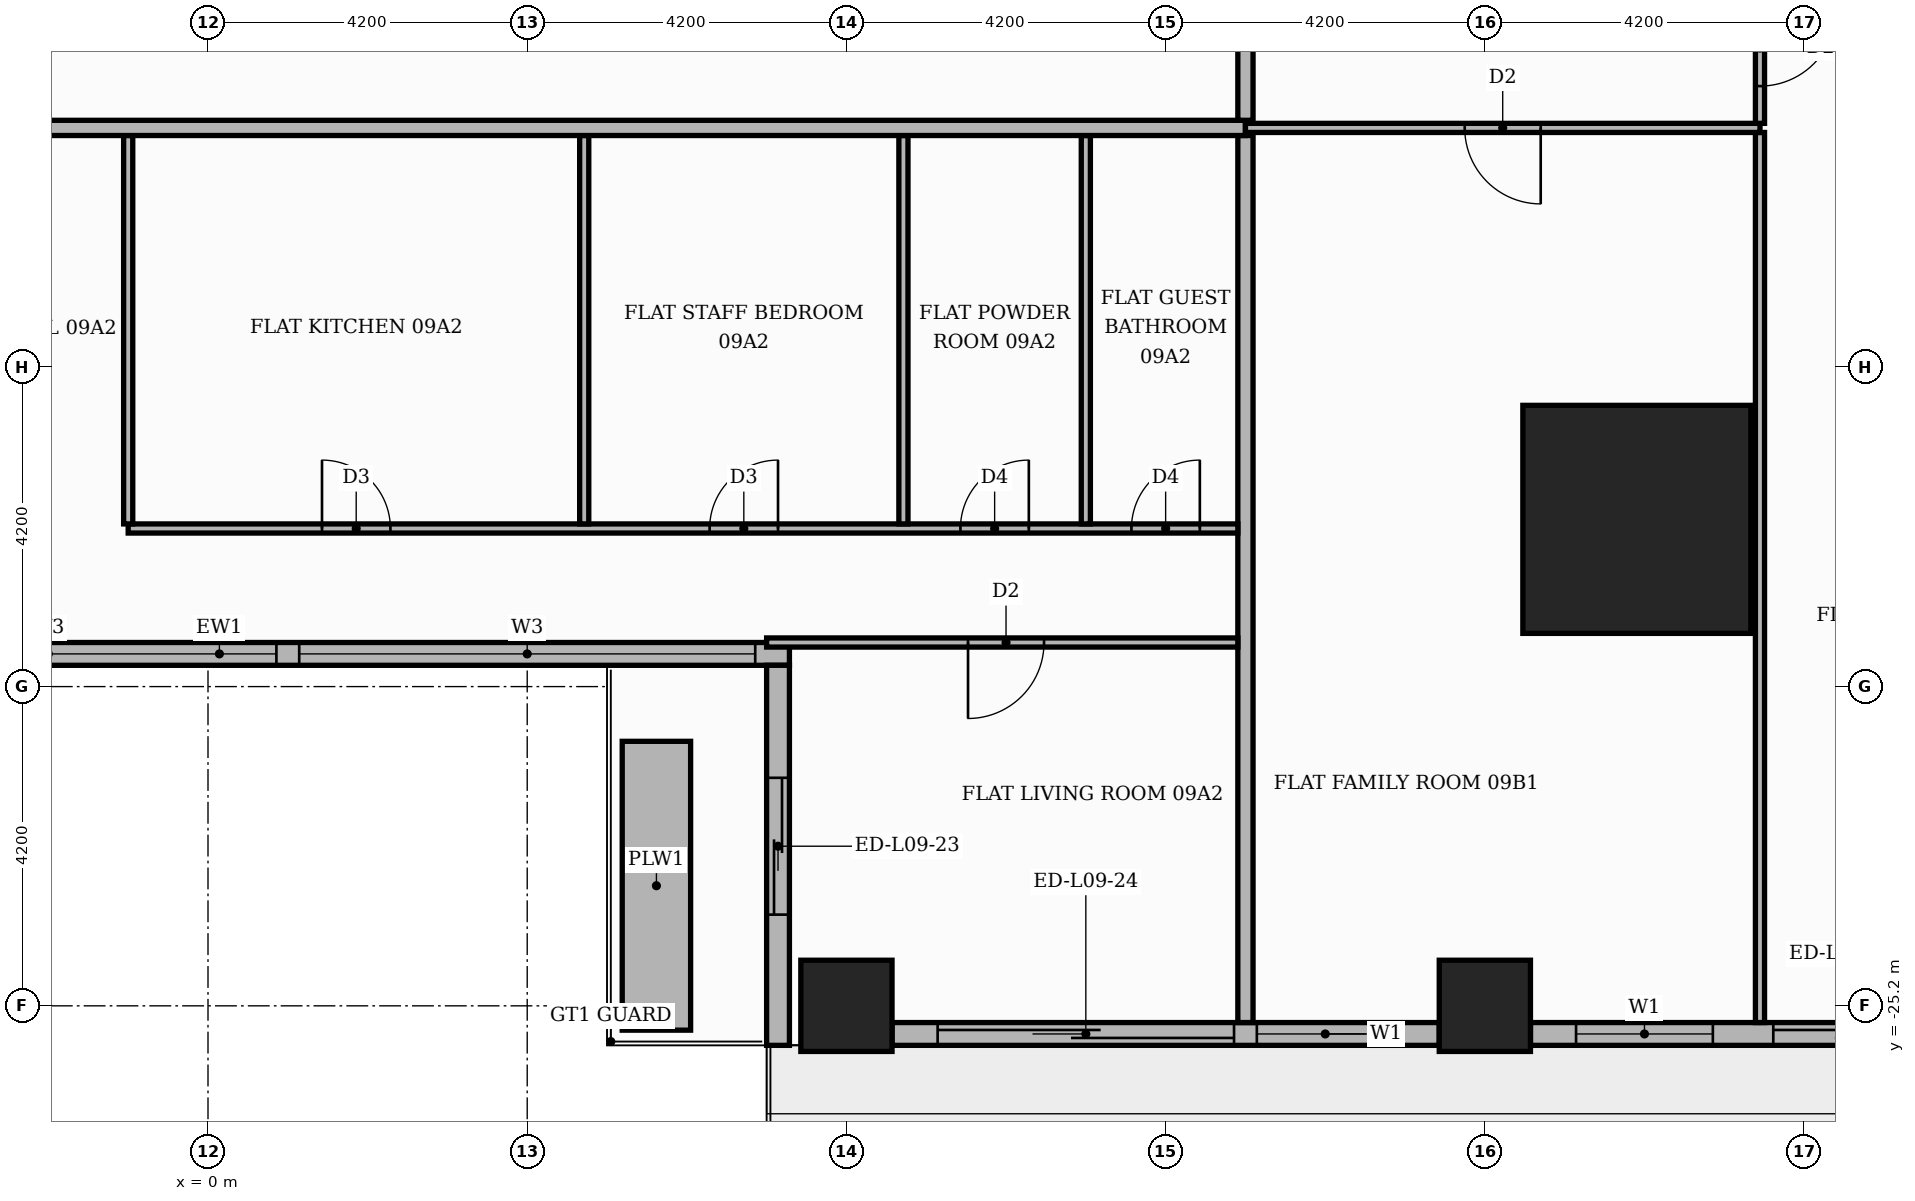
"""IFC4 building model, lengths in metres.
Left out: names, types, materials, properties, quantities, classifications, styles, units other than length and angle.
Written with IfcOpenShell. Run it as: python <this file> out.ifc"""

import sys

from ifc_helpers import new_model, si_unit, direction, frame, frame_2d, origin, origin_2d, place, context, subcontext, project, spatial, rectangle, extrude, element, fill, save


model = new_model("IFC4")
c1 = context("Model", 3, precision=1e-05, world=origin(), true_north=direction((0.0, 1.0)))
c2 = subcontext(c1, "Body", "Model", "MODEL_VIEW")
j1 = project(units=[si_unit("LENGTHUNIT", "METRE"), si_unit("PLANEANGLEUNIT", "RADIAN")], contexts=[c1])
p1 = place(None, origin())
s1 = spatial("IfcSite", under=j1, at=p1, CompositionType="ELEMENT")
p2 = place(p1, origin())
s2 = spatial("IfcBuilding", under=s1, at=p2, CompositionType="ELEMENT")
p3 = place(p2, frame((0.0, 0.0, 42.6)))
s3 = spatial("IfcBuildingStorey", under=s2, at=p3, CompositionType="ELEMENT", Elevation=42.6)
p4 = place(p3, frame((18.8, -18.8, 0.0), z_axis=(0.0, 0.0, 1.0), x_axis=(1.0, 0.0, 0.0)))
e1 = element("IfcColumn", 1, at=p4, inside=s3, PredefinedType="COLUMN", context=c2, shape_type="SweptSolid", body=[
    extrude(rectangle(XDim=3.0, YDim=3.0, at=origin_2d()), origin(), (0.0, 0.0, 1.0), 3.9),
])
for number, where, z_axis, x_axis in (
    (2, (8.4, -25.2, 0.0), (0.0, 0.0, 1.0), (1.0, 0.0, 0.0)),
    (3, (16.8, -25.2, 0.0), (0.0, 0.0, 1.0), (1.0, 0.0, 0.0)),
):
    element("IfcColumn", number, at=place(p3, frame(where, z_axis=z_axis, x_axis=x_axis)), inside=s3, PredefinedType="COLUMN", context=c2, shape_type="SweptSolid", body=[
        extrude(rectangle(XDim=1.2, YDim=1.2, at=origin_2d()), origin(), (0.0, 0.0, 1.0), 3.9),
    ])
p5 = place(p3, frame((-7.35, -20.57, 0.0), z_axis=(0.0, 0.0, 1.0), x_axis=(1.0, 0.0, 0.0)))
e4 = element("IfcWall", 4, at=p5, inside=s3, PredefinedType="STANDARD", context=c2, shape_type="SweptSolid", body=[
    extrude(rectangle(XDim=15.0, YDim=0.3, at=frame_2d((7.5, 0.0))), origin(), (0.0, 0.0, 1.0), 3.48),
])
p6 = place(p5, frame((0.15, 0.0, 0.9)))
e5 = element("IfcOpeningElement", 5, at=p6, cuts=e4, PredefinedType="OPENING", context=c2, shape_type="SweptSolid", body=[
    extrude(rectangle(XDim=1.8, YDim=2.1, at=frame_2d((0.9, 1.05))), frame((0.0, 0.16, 0.0), z_axis=(0.0, -1.0, 0.0), x_axis=(1.0, 0.0, 0.0)), (0.0, 0.0, 1.0), 0.32),
])
p7 = place(p5, frame((2.25, 0.0, 0.9)))
e6 = element("IfcOpeningElement", 6, at=p7, cuts=e4, PredefinedType="OPENING", context=c2, shape_type="SweptSolid", body=[
    extrude(rectangle(XDim=6.0, YDim=2.1, at=frame_2d((3.0, 1.05))), frame((0.0, 0.16, 0.0), z_axis=(0.0, -1.0, 0.0), x_axis=(1.0, 0.0, 0.0)), (0.0, 0.0, 1.0), 0.32),
])
p8 = place(p5, frame((8.55, 0.0, 0.9)))
e7 = element("IfcOpeningElement", 7, at=p8, cuts=e4, PredefinedType="OPENING", context=c2, shape_type="SweptSolid", body=[
    extrude(rectangle(XDim=6.0, YDim=2.1, at=frame_2d((3.0, 1.05))), frame((0.0, 0.16, 0.0), z_axis=(0.0, -1.0, 0.0), x_axis=(1.0, 0.0, 0.0)), (0.0, 0.0, 1.0), 0.32),
])
p9 = place(p3, frame((7.5, -20.72, 0.0), z_axis=(0.0, 0.0, 1.0), x_axis=(0.0, -1.0, 0.0)))
e8 = element("IfcWall", 8, at=p9, inside=s3, PredefinedType="STANDARD", context=c2, shape_type="SweptSolid", body=[
    extrude(rectangle(XDim=5.0, YDim=0.3, at=frame_2d((2.5, 0.0))), origin(), (0.0, 0.0, 1.0), 3.48),
])
p10 = place(p9, frame((1.48, 0.0, 0.0)))
e9 = element("IfcOpeningElement", 9, at=p10, cuts=e8, PredefinedType="OPENING", context=c2, shape_type="SweptSolid", body=[
    extrude(rectangle(XDim=1.8, YDim=2.4, at=frame_2d((0.9, 1.2))), frame((0.0, 0.16, 0.0), z_axis=(0.0, -1.0, 0.0), x_axis=(1.0, 0.0, 0.0)), (0.0, 0.0, 1.0), 0.32),
])
p11 = place(p3, frame((9.0, -25.57, 0.0), z_axis=(0.0, 0.0, 1.0), x_axis=(1.0, 0.0, 0.0)))
e10 = element("IfcWall", 10, at=p11, inside=s3, PredefinedType="STANDARD", context=c2, shape_type="SweptSolid", body=[
    extrude(rectangle(XDim=7.2, YDim=0.3, at=frame_2d((3.6, 0.0))), origin(), (0.0, 0.0, 1.0), 3.48),
])
p12 = place(p11, frame((0.6, 0.0, 0.0)))
e11 = element("IfcOpeningElement", 11, at=p12, cuts=e10, PredefinedType="OPENING", context=c2, shape_type="SweptSolid", body=[
    extrude(rectangle(XDim=3.9, YDim=2.4, at=frame_2d((1.95, 1.2))), frame((0.0, 0.16, 0.0), z_axis=(0.0, -1.0, 0.0), x_axis=(1.0, 0.0, 0.0)), (0.0, 0.0, 1.0), 0.32),
])
p13 = place(p11, frame((4.8, 0.0, 0.9)))
e12 = element("IfcOpeningElement", 12, at=p13, cuts=e10, PredefinedType="OPENING", context=c2, shape_type="SweptSolid", body=[
    extrude(rectangle(XDim=1.8, YDim=2.1, at=frame_2d((0.9, 1.05))), frame((0.0, 0.16, 0.0), z_axis=(0.0, -1.0, 0.0), x_axis=(1.0, 0.0, 0.0)), (0.0, 0.0, 1.0), 0.32),
])
p14 = place(p3, frame((17.4, -25.57, 0.0), z_axis=(0.0, 0.0, 1.0), x_axis=(1.0, 0.0, 0.0)))
e13 = element("IfcWall", 13, at=p14, inside=s3, PredefinedType="STANDARD", context=c2, shape_type="SweptSolid", body=[
    extrude(rectangle(XDim=5.32, YDim=0.3, at=frame_2d((2.66, 0.0))), origin(), (0.0, 0.0, 1.0), 3.48),
])
p15 = place(p14, frame((0.6, 0.0, 0.9)))
e14 = element("IfcOpeningElement", 14, at=p15, cuts=e13, PredefinedType="OPENING", context=c2, shape_type="SweptSolid", body=[
    extrude(rectangle(XDim=1.8, YDim=2.1, at=frame_2d((0.9, 1.05))), frame((0.0, 0.16, 0.0), z_axis=(0.0, -1.0, 0.0), x_axis=(1.0, 0.0, 0.0)), (0.0, 0.0, 1.0), 0.32),
])
p16 = place(p14, frame((3.195, 0.0, 0.0)))
e15 = element("IfcOpeningElement", 15, at=p16, cuts=e13, PredefinedType="OPENING", context=c2, shape_type="SweptSolid", body=[
    extrude(rectangle(XDim=1.8, YDim=2.4, at=frame_2d((0.9, 1.2))), frame((0.0, 0.16, 0.0), z_axis=(0.0, -1.0, 0.0), x_axis=(1.0, 0.0, 0.0)), (0.0, 0.0, 1.0), 0.32),
])
p17 = place(p3, frame((5.9, -25.52, 0.0), z_axis=(0.0, 0.0, 1.0), x_axis=(0.0, 1.0, 0.0)))
e16 = element("IfcWall", 16, at=p17, inside=s3, PredefinedType="MOVABLE", context=c2, shape_type="SweptSolid", body=[
    extrude(rectangle(XDim=3.8, YDim=0.9, at=frame_2d((1.9, 0.0))), origin(), (0.0, 0.0, 1.0), 0.6),
])
p18 = place(p3, frame((13.65, -25.42, 0.0), z_axis=(0.0, 0.0, 1.0), x_axis=(0.0, 1.0, 0.0)))
e17 = element("IfcWall", 17, at=p18, inside=s3, PredefinedType="PARTITIONING", context=c2, shape_type="SweptSolid", body=[
    extrude(rectangle(XDim=11.67, YDim=0.2, at=frame_2d((5.835, 0.0))), origin(), (0.0, 0.0, 1.0), 3.48),
])
p19 = place(p3, frame((20.42, -25.42, 0.0), z_axis=(0.0, 0.0, 1.0), x_axis=(0.0, 1.0, 0.0)))
e18 = element("IfcWall", 18, at=p19, inside=s3, PredefinedType="PARTITIONING", context=c2, shape_type="SweptSolid", body=[
    extrude(rectangle(XDim=11.71, YDim=0.12, at=frame_2d((5.855, 0.0))), origin(), (0.0, 0.0, 1.0), 3.48),
])
p20 = place(p3, frame((7.35, -20.42, 0.0), z_axis=(0.0, 0.0, 1.0), x_axis=(1.0, 0.0, 0.0)))
e19 = element("IfcWall", 19, at=p20, inside=s3, PredefinedType="PARTITIONING", context=c2, shape_type="SweptSolid", body=[
    extrude(rectangle(XDim=6.2, YDim=0.12, at=frame_2d((3.1, 0.0))), origin(), (0.0, 0.0, 1.0), 3.48),
])
p21 = place(p20, frame((2.65, 0.0, 0.0)))
e20 = element("IfcOpeningElement", 20, at=p21, cuts=e19, PredefinedType="OPENING", context=c2, shape_type="SweptSolid", body=[
    extrude(rectangle(XDim=1.0, YDim=2.1, at=frame_2d((0.5, 1.05))), frame((0.0, 0.07, 0.0), z_axis=(0.0, -1.0, 0.0), x_axis=(1.0, 0.0, 0.0)), (0.0, 0.0, 1.0), 0.14),
])
p22 = place(p3, frame((-1.05, -18.92, 0.0), z_axis=(0.0, 0.0, 1.0), x_axis=(1.0, 0.0, 0.0)))
e21 = element("IfcWall", 21, at=p22, inside=s3, PredefinedType="PARTITIONING", context=c2, shape_type="SweptSolid", body=[
    extrude(rectangle(XDim=14.6, YDim=0.12, at=frame_2d((7.3, 0.0))), origin(), (0.0, 0.0, 1.0), 3.48),
])
p23 = place(p22, frame((2.55, 0.0, 0.0)))
e22 = element("IfcOpeningElement", 22, at=p23, cuts=e21, PredefinedType="OPENING", context=c2, shape_type="SweptSolid", body=[
    extrude(rectangle(XDim=0.9, YDim=2.1, at=frame_2d((0.45, 1.05))), frame((0.0, 0.07, 0.0), z_axis=(0.0, -1.0, 0.0), x_axis=(1.0, 0.0, 0.0)), (0.0, 0.0, 1.0), 0.14),
])
p24 = place(p22, frame((7.65, 0.0, 0.0)))
e23 = element("IfcOpeningElement", 23, at=p24, cuts=e21, PredefinedType="OPENING", context=c2, shape_type="SweptSolid", body=[
    extrude(rectangle(XDim=0.9, YDim=2.1, at=frame_2d((0.45, 1.05))), frame((0.0, 0.07, 0.0), z_axis=(0.0, -1.0, 0.0), x_axis=(1.0, 0.0, 0.0)), (0.0, 0.0, 1.0), 0.14),
])
p25 = place(p22, frame((10.95, 0.0, 0.0)))
e24 = element("IfcOpeningElement", 24, at=p25, cuts=e21, PredefinedType="OPENING", context=c2, shape_type="SweptSolid", body=[
    extrude(rectangle(XDim=0.9, YDim=2.1, at=frame_2d((0.45, 1.05))), frame((0.0, 0.07, 0.0), z_axis=(0.0, -1.0, 0.0), x_axis=(1.0, 0.0, 0.0)), (0.0, 0.0, 1.0), 0.14),
])
p26 = place(p22, frame((13.2, 0.0, 0.0)))
e25 = element("IfcOpeningElement", 25, at=p26, cuts=e21, PredefinedType="OPENING", context=c2, shape_type="SweptSolid", body=[
    extrude(rectangle(XDim=0.9, YDim=2.1, at=frame_2d((0.45, 1.05))), frame((0.0, 0.07, 0.0), z_axis=(0.0, -1.0, 0.0), x_axis=(1.0, 0.0, 0.0)), (0.0, 0.0, 1.0), 0.14),
])
for number, where, z_axis, x_axis in (
    (26, (-1.05, -18.86, 0.0), (0.0, 0.0, 1.0), (0.0, 1.0, 0.0)),
    (27, (4.95, -18.86, 0.0), (0.0, 0.0, 1.0), (0.0, 1.0, 0.0)),
    (28, (9.15, -18.86, 0.0), (0.0, 0.0, 1.0), (0.0, 1.0, 0.0)),
    (29, (11.55, -18.86, 0.0), (0.0, 0.0, 1.0), (0.0, 1.0, 0.0)),
):
    element("IfcWall", number, at=place(p3, frame(where, z_axis=z_axis, x_axis=x_axis)), inside=s3, PredefinedType="PARTITIONING", context=c2, shape_type="SweptSolid", body=[
        extrude(rectangle(XDim=5.11, YDim=0.12, at=frame_2d((2.555, 0.0))), origin(), (0.0, 0.0, 1.0), 3.48),
    ])
p27 = place(p3, frame((-25.42, -13.65, 0.0), z_axis=(0.0, 0.0, 1.0), x_axis=(1.0, 0.0, 0.0)))
e30 = element("IfcWall", 30, at=p27, inside=s3, PredefinedType="PARTITIONING", context=c2, shape_type="SweptSolid", body=[
    extrude(rectangle(XDim=39.07, YDim=0.2, at=frame_2d((19.535, 0.0))), origin(), (0.0, 0.0, 1.0), 3.48),
])
p28 = place(p27, frame((13.32, 0.0, 0.0)))
e31 = element("IfcOpeningElement", 31, at=p28, cuts=e30, PredefinedType="OPENING", context=c2, shape_type="SweptSolid", body=[
    extrude(rectangle(XDim=1.1, YDim=2.4, at=frame_2d((0.55, 1.2))), frame((0.0, 0.11, 0.0), z_axis=(0.0, -1.0, 0.0), x_axis=(1.0, 0.0, 0.0)), (0.0, 0.0, 1.0), 0.22),
])
p29 = place(p27, frame((21.72, 0.0, 0.0)))
e32 = element("IfcOpeningElement", 32, at=p29, cuts=e30, PredefinedType="OPENING", context=c2, shape_type="SweptSolid", body=[
    extrude(rectangle(XDim=1.1, YDim=2.4, at=frame_2d((0.55, 1.2))), frame((0.0, 0.11, 0.0), z_axis=(0.0, -1.0, 0.0), x_axis=(1.0, 0.0, 0.0)), (0.0, 0.0, 1.0), 0.22),
])
p30 = place(p3, frame((13.65, -13.65, 0.0), z_axis=(0.0, 0.0, 1.0), x_axis=(1.0, 0.0, 0.0)))
e33 = element("IfcWall", 33, at=p30, inside=s3, PredefinedType="PARTITIONING", context=c2, shape_type="SweptSolid", body=[
    extrude(rectangle(XDim=6.77, YDim=0.12, at=frame_2d((3.385, 0.0))), origin(), (0.0, 0.0, 1.0), 3.48),
])
p31 = place(p30, frame((2.885, 0.0, 0.0)))
e34 = element("IfcOpeningElement", 34, at=p31, cuts=e33, PredefinedType="OPENING", context=c2, shape_type="SweptSolid", body=[
    extrude(rectangle(XDim=1.0, YDim=2.1, at=frame_2d((0.5, 1.05))), frame((0.0, 0.07, 0.0), z_axis=(0.0, -1.0, 0.0), x_axis=(1.0, 0.0, 0.0)), (0.0, 0.0, 1.0), 0.14),
])
p32 = place(p3, frame((20.42, -13.59, 0.0), z_axis=(0.0, 0.0, 1.0), x_axis=(0.0, 1.0, 0.0)))
e35 = element("IfcWall", 35, at=p32, inside=s3, PredefinedType="PARTITIONING", context=c2, shape_type="SweptSolid", body=[
    extrude(rectangle(XDim=1.98, YDim=0.12, at=frame_2d((0.99, 0.0))), origin(), (0.0, 0.0, 1.0), 3.48),
])
p33 = place(p32, frame((0.49, 0.0, 0.0)))
e36 = element("IfcOpeningElement", 36, at=p33, cuts=e35, PredefinedType="OPENING", context=c2, shape_type="SweptSolid", body=[
    extrude(rectangle(XDim=1.0, YDim=2.1, at=frame_2d((0.5, 1.05))), frame((0.0, 0.07, 0.0), z_axis=(0.0, -1.0, 0.0), x_axis=(1.0, 0.0, 0.0)), (0.0, 0.0, 1.0), 0.14),
])
p34 = place(p3, frame((13.65, -13.55, 0.0), z_axis=(0.0, 0.0, 1.0), x_axis=(0.0, 1.0, 0.0)))
e37 = element("IfcWall", 37, at=p34, inside=s3, PredefinedType="PARTITIONING", context=c2, shape_type="SweptSolid", body=[
    extrude(rectangle(XDim=27.1, YDim=0.2, at=frame_2d((13.55, 0.0))), origin(), (0.0, 0.0, 1.0), 3.48),
])
p35 = place(p34, frame((2.5, 0.0, 0.0)))
e38 = element("IfcOpeningElement", 38, at=p35, cuts=e37, PredefinedType="OPENING", context=c2, shape_type="SweptSolid", body=[
    extrude(rectangle(XDim=1.1, YDim=2.4, at=frame_2d((0.55, 1.2))), frame((0.0, 0.11, 0.0), z_axis=(0.0, -1.0, 0.0), x_axis=(1.0, 0.0, 0.0)), (0.0, 0.0, 1.0), 0.22),
])
p36 = place(p7, origin())
e39 = element("IfcWindow", 39, at=p36, inside=s3, PartitioningType="SINGLE_PANEL", PredefinedType="WINDOW", context=c2, shape_type="SweptSolid", body=[
    extrude(rectangle(XDim=6.0, YDim=2.1, at=frame_2d((3.0, 1.05))), frame((0.0, 0.03, 0.0), z_axis=(0.0, -1.0, 0.0), x_axis=(1.0, 0.0, 0.0)), (0.0, 0.0, 1.0), 0.06),
])
fill(e6, e39)
p37 = place(p8, origin())
e40 = element("IfcWindow", 40, at=p37, inside=s3, PartitioningType="SINGLE_PANEL", PredefinedType="WINDOW", context=c2, shape_type="SweptSolid", body=[
    extrude(rectangle(XDim=6.0, YDim=2.1, at=frame_2d((3.0, 1.05))), frame((0.0, 0.03, 0.0), z_axis=(0.0, -1.0, 0.0), x_axis=(1.0, 0.0, 0.0)), (0.0, 0.0, 1.0), 0.06),
])
fill(e7, e40)
p38 = place(p10, origin())
e41 = element("IfcDoor", 41, at=p38, inside=s3, OperationType="SLIDING_TO_RIGHT", PredefinedType="DOOR", context=c2, shape_type="SweptSolid", body=[
    extrude(rectangle(XDim=1.8, YDim=2.4, at=frame_2d((0.9, 1.2))), frame((0.0, 0.025, 0.0), z_axis=(0.0, -1.0, 0.0), x_axis=(1.0, 0.0, 0.0)), (0.0, 0.0, 1.0), 0.05),
])
fill(e9, e41)
p39 = place(p12, origin())
e42 = element("IfcDoor", 42, at=p39, inside=s3, OperationType="SLIDING_TO_LEFT", PredefinedType="DOOR", context=c2, shape_type="SweptSolid", body=[
    extrude(rectangle(XDim=3.9, YDim=2.4, at=frame_2d((1.95, 1.2))), frame((0.0, 0.025, 0.0), z_axis=(0.0, -1.0, 0.0), x_axis=(1.0, 0.0, 0.0)), (0.0, 0.0, 1.0), 0.05),
])
fill(e11, e42)
p40 = place(p13, origin())
e43 = element("IfcWindow", 43, at=p40, inside=s3, PartitioningType="SINGLE_PANEL", PredefinedType="WINDOW", context=c2, shape_type="SweptSolid", body=[
    extrude(rectangle(XDim=1.8, YDim=2.1, at=frame_2d((0.9, 1.05))), frame((0.0, 0.03, 0.0), z_axis=(0.0, -1.0, 0.0), x_axis=(1.0, 0.0, 0.0)), (0.0, 0.0, 1.0), 0.06),
])
fill(e12, e43)
p41 = place(p15, origin())
e44 = element("IfcWindow", 44, at=p41, inside=s3, PartitioningType="SINGLE_PANEL", PredefinedType="WINDOW", context=c2, shape_type="SweptSolid", body=[
    extrude(rectangle(XDim=1.8, YDim=2.1, at=frame_2d((0.9, 1.05))), frame((0.0, 0.03, 0.0), z_axis=(0.0, -1.0, 0.0), x_axis=(1.0, 0.0, 0.0)), (0.0, 0.0, 1.0), 0.06),
])
fill(e14, e44)
p42 = place(p16, origin())
e45 = element("IfcDoor", 45, at=p42, inside=s3, OperationType="SLIDING_TO_RIGHT", PredefinedType="DOOR", context=c2, shape_type="SweptSolid", body=[
    extrude(rectangle(XDim=1.8, YDim=2.4, at=frame_2d((0.9, 1.2))), frame((0.0, 0.025, 0.0), z_axis=(0.0, -1.0, 0.0), x_axis=(1.0, 0.0, 0.0)), (0.0, 0.0, 1.0), 0.05),
])
fill(e15, e45)
p43 = place(p23, origin())
e46 = element("IfcDoor", 46, at=p43, inside=s3, OperationType="SINGLE_SWING_LEFT", PredefinedType="DOOR", context=c2, shape_type="SweptSolid", body=[
    extrude(rectangle(XDim=0.9, YDim=2.1, at=frame_2d((0.45, 1.05))), frame((0.0, 0.025, 0.0), z_axis=(0.0, -1.0, 0.0), x_axis=(1.0, 0.0, 0.0)), (0.0, 0.0, 1.0), 0.05),
])
fill(e22, e46)
p44 = place(p24, origin())
e47 = element("IfcDoor", 47, at=p44, inside=s3, OperationType="SINGLE_SWING_RIGHT", PredefinedType="DOOR", context=c2, shape_type="SweptSolid", body=[
    extrude(rectangle(XDim=0.9, YDim=2.1, at=frame_2d((0.45, 1.05))), frame((0.0, 0.025, 0.0), z_axis=(0.0, -1.0, 0.0), x_axis=(1.0, 0.0, 0.0)), (0.0, 0.0, 1.0), 0.05),
])
fill(e23, e47)
p45 = place(p25, origin())
e48 = element("IfcDoor", 48, at=p45, inside=s3, OperationType="SINGLE_SWING_RIGHT", PredefinedType="DOOR", context=c2, shape_type="SweptSolid", body=[
    extrude(rectangle(XDim=0.9, YDim=2.1, at=frame_2d((0.45, 1.05))), frame((0.0, 0.025, 0.0), z_axis=(0.0, -1.0, 0.0), x_axis=(1.0, 0.0, 0.0)), (0.0, 0.0, 1.0), 0.05),
])
fill(e24, e48)
p46 = place(p26, origin())
e49 = element("IfcDoor", 49, at=p46, inside=s3, OperationType="SINGLE_SWING_RIGHT", PredefinedType="DOOR", context=c2, shape_type="SweptSolid", body=[
    extrude(rectangle(XDim=0.9, YDim=2.1, at=frame_2d((0.45, 1.05))), frame((0.0, 0.025, 0.0), z_axis=(0.0, -1.0, 0.0), x_axis=(1.0, 0.0, 0.0)), (0.0, 0.0, 1.0), 0.05),
])
fill(e25, e49)
p47 = place(p21, frame((1.0, 0.0, 0.0), z_axis=(0.0, 0.0, 1.0), x_axis=(-1.0, 0.0, 0.0)))
e50 = element("IfcDoor", 50, at=p47, inside=s3, OperationType="SINGLE_SWING_LEFT", PredefinedType="DOOR", context=c2, shape_type="SweptSolid", body=[
    extrude(rectangle(XDim=1.0, YDim=2.1, at=frame_2d((0.5, 1.05))), frame((0.0, 0.025, 0.0), z_axis=(0.0, -1.0, 0.0), x_axis=(1.0, 0.0, 0.0)), (0.0, 0.0, 1.0), 0.05),
])
fill(e20, e50)
p48 = place(p31, frame((1.0, 0.0, 0.0), z_axis=(0.0, 0.0, 1.0), x_axis=(-1.0, 0.0, 0.0)))
e51 = element("IfcDoor", 51, at=p48, inside=s3, OperationType="SINGLE_SWING_RIGHT", PredefinedType="DOOR", context=c2, shape_type="SweptSolid", body=[
    extrude(rectangle(XDim=1.0, YDim=2.1, at=frame_2d((0.5, 1.05))), frame((0.0, 0.025, 0.0), z_axis=(0.0, -1.0, 0.0), x_axis=(1.0, 0.0, 0.0)), (0.0, 0.0, 1.0), 0.05),
])
fill(e34, e51)
p49 = place(p33, frame((1.0, 0.0, 0.0), z_axis=(0.0, 0.0, 1.0), x_axis=(-1.0, 0.0, 0.0)))
e52 = element("IfcDoor", 52, at=p49, inside=s3, OperationType="SINGLE_SWING_RIGHT", PredefinedType="DOOR", context=c2, shape_type="SweptSolid", body=[
    extrude(rectangle(XDim=1.0, YDim=2.1, at=frame_2d((0.5, 1.05))), frame((0.0, 0.025, 0.0), z_axis=(0.0, -1.0, 0.0), x_axis=(1.0, 0.0, 0.0)), (0.0, 0.0, 1.0), 0.05),
])
fill(e36, e52)
save(model, sys.argv[1])
